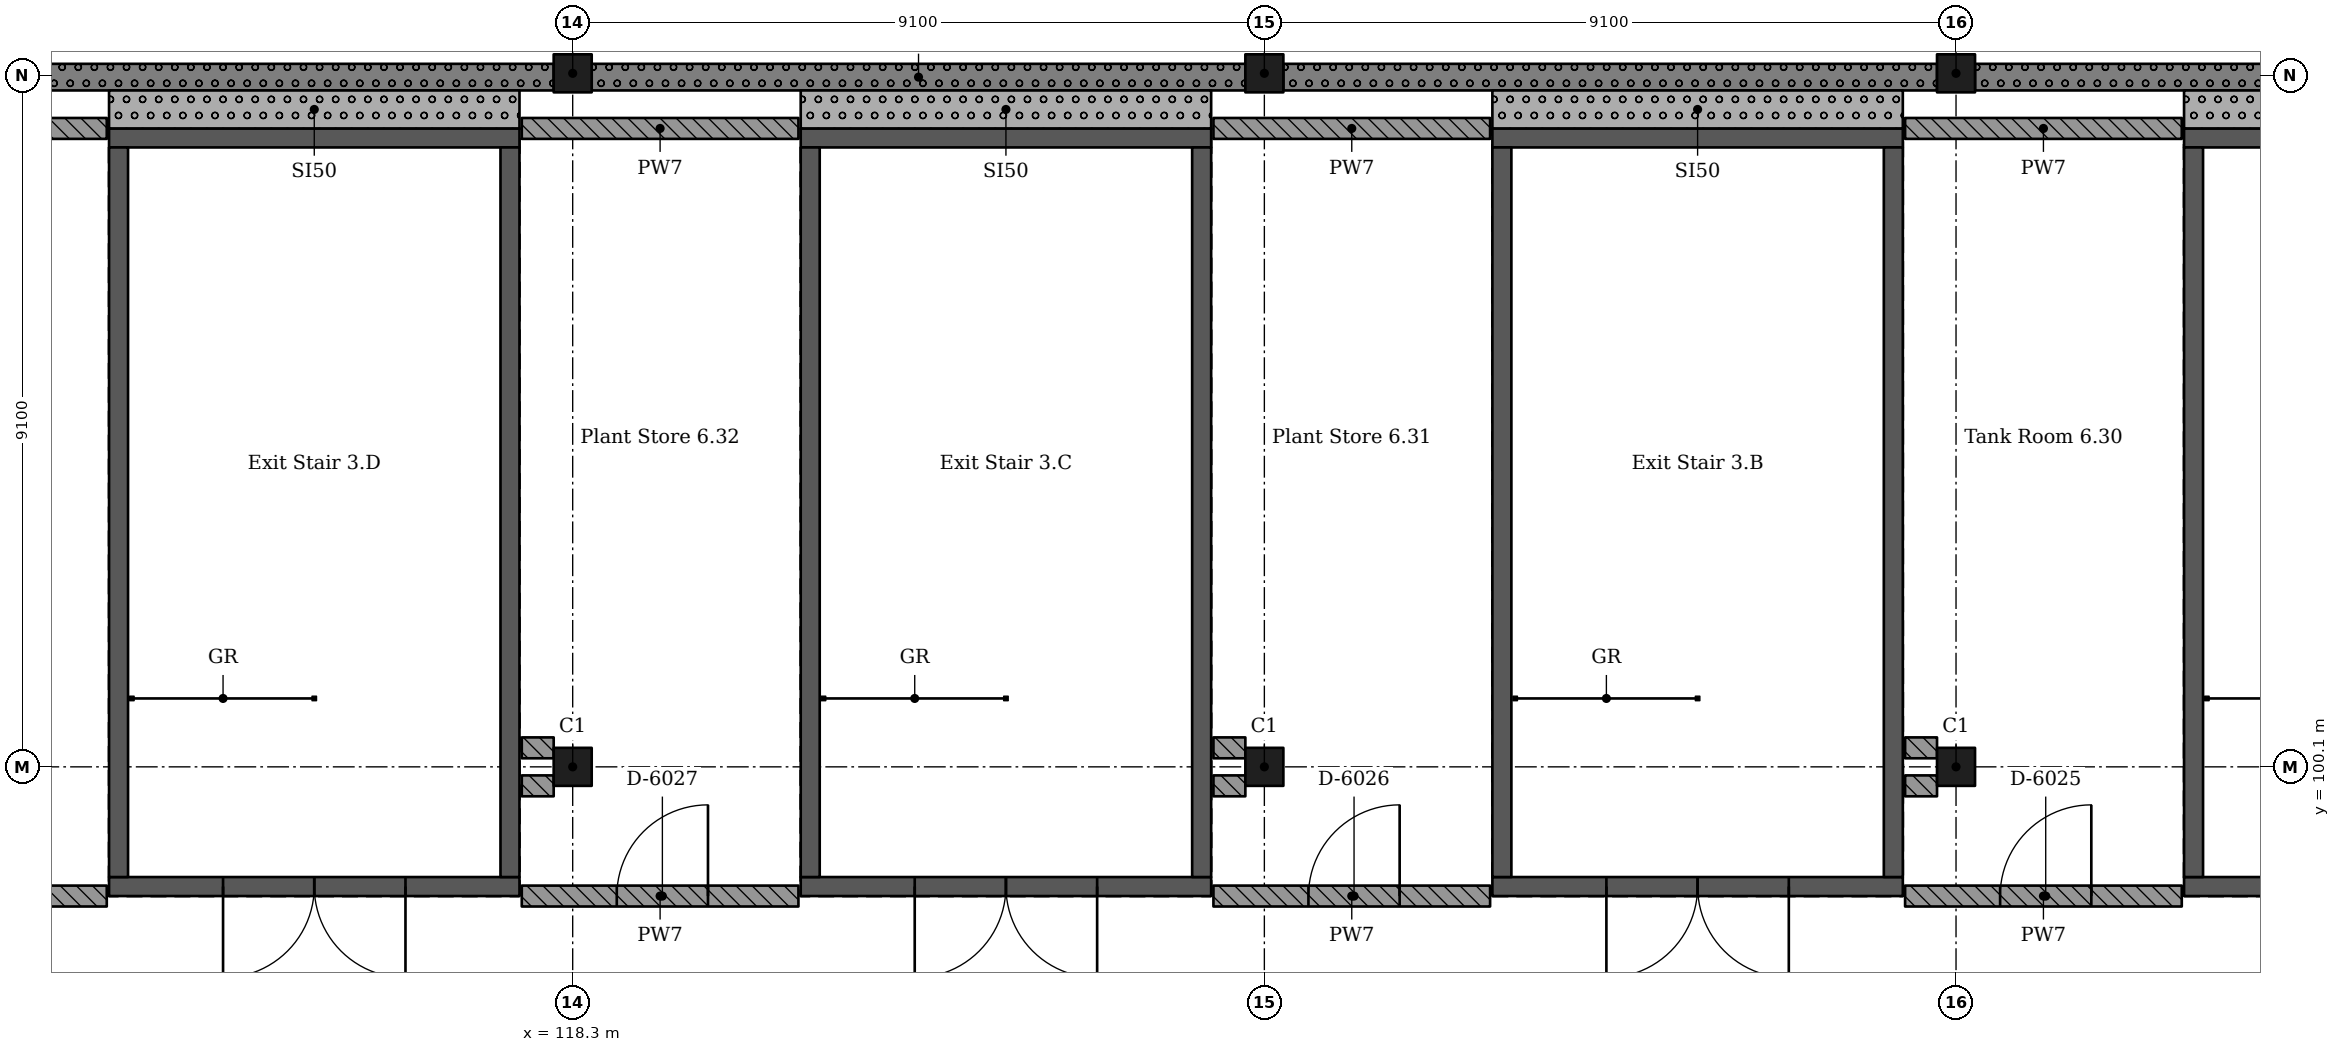
"""IFC4 building model, lengths in metres.
Left out: names, types, materials, properties, quantities, classifications, styles, units other than length and angle.
Written with IfcOpenShell. Run it as: python <this file> out.ifc"""

import sys

from ifc_helpers import new_model, si_unit, direction, frame, frame_2d, origin, origin_2d, place, context, subcontext, project, spatial, rectangle, extrude, element, fill, save


model = new_model("IFC4")
c1 = context("Model", 3, precision=1e-05, world=origin(), true_north=direction((0.0, 1.0)))
c2 = subcontext(c1, "Body", "Model", "MODEL_VIEW")
j1 = project(units=[si_unit("LENGTHUNIT", "METRE"), si_unit("PLANEANGLEUNIT", "RADIAN")], contexts=[c1])
p1 = place(None, origin())
s1 = spatial("IfcSite", under=j1, at=p1, CompositionType="ELEMENT")
p2 = place(p1, origin())
s2 = spatial("IfcBuilding", under=s1, at=p2, CompositionType="ELEMENT")
p3 = place(p2, frame((0.0, 0.0, 29.12)))
s3 = spatial("IfcBuildingStorey", under=s2, at=p3, CompositionType="ELEMENT", Elevation=29.12)
for number, where, z_axis, x_axis in (
    (1, (118.3, 100.1, 0.0), (0.0, 0.0, 1.0), (1.0, 0.0, 0.0)),
    (2, (118.3, 109.225, 0.0), (0.0, 0.0, 1.0), (1.0, 0.0, 0.0)),
    (3, (127.4, 100.1, 0.0), (0.0, 0.0, 1.0), (1.0, 0.0, 0.0)),
    (4, (127.4, 109.225, 0.0), (0.0, 0.0, 1.0), (1.0, 0.0, 0.0)),
    (5, (136.5, 100.1, 0.0), (0.0, 0.0, 1.0), (1.0, 0.0, 0.0)),
    (6, (136.5, 109.225, 0.0), (0.0, 0.0, 1.0), (1.0, 0.0, 0.0)),
):
    element("IfcColumn", number, at=place(p3, frame(where, z_axis=z_axis, x_axis=x_axis)), inside=s3, PredefinedType="COLUMN", context=c2, shape_type="SweptSolid", body=[
        extrude(rectangle(XDim=0.5, YDim=0.5, at=origin_2d()), origin(), (0.0, 0.0, 1.0), 4.55),
    ])
p4 = place(p3, frame((144.9, 98.525, 0.0), z_axis=(0.0, 0.0, 1.0), x_axis=(-1.0, 0.0, 0.0)))
e7 = element("IfcWall", 7, at=p4, inside=s3, PredefinedType="SHEAR", context=c2, shape_type="SweptSolid", body=[
    extrude(rectangle(XDim=5.4, YDim=0.25, at=frame_2d((2.7, 0.0))), origin(), (0.0, 0.0, 1.0), 4.55),
])
p5 = place(p4, frame((1.5, 0.0, 0.0)))
e8 = element("IfcOpeningElement", 8, at=p5, cuts=e7, PredefinedType="OPENING", context=c2, shape_type="SweptSolid", body=[
    extrude(rectangle(XDim=2.4, YDim=2.1, at=frame_2d((1.2, 1.05))), frame((0.0, 0.135, 0.0), z_axis=(0.0, -1.0, 0.0), x_axis=(1.0, 0.0, 0.0)), (0.0, 0.0, 1.0), 0.27),
])
p6 = place(p3, frame((144.9, 108.375, 0.0), z_axis=(0.0, 0.0, 1.0), x_axis=(-1.0, 0.0, 0.0)))
e9 = element("IfcWall", 9, at=p6, inside=s3, PredefinedType="SHEAR", context=c2, shape_type="SweptSolid", body=[
    extrude(rectangle(XDim=5.4, YDim=0.25, at=frame_2d((2.7, 0.0))), origin(), (0.0, 0.0, 1.0), 4.55),
])
p7 = place(p3, frame((139.625, 108.25, 0.0), z_axis=(0.0, 0.0, 1.0), x_axis=(0.0, -1.0, 0.0)))
e10 = element("IfcWall", 10, at=p7, inside=s3, PredefinedType="SHEAR", context=c2, shape_type="SweptSolid", body=[
    extrude(rectangle(XDim=9.6, YDim=0.25, at=frame_2d((4.8, 0.0))), origin(), (0.0, 0.0, 1.0), 4.55),
])
p8 = place(p3, frame((135.8, 98.525, 0.0), z_axis=(0.0, 0.0, 1.0), x_axis=(-1.0, 0.0, 0.0)))
e11 = element("IfcWall", 11, at=p8, inside=s3, PredefinedType="SHEAR", context=c2, shape_type="SweptSolid", body=[
    extrude(rectangle(XDim=5.4, YDim=0.25, at=frame_2d((2.7, 0.0))), origin(), (0.0, 0.0, 1.0), 4.55),
])
p9 = place(p8, frame((1.5, 0.0, 0.0)))
e12 = element("IfcOpeningElement", 12, at=p9, cuts=e11, PredefinedType="OPENING", context=c2, shape_type="SweptSolid", body=[
    extrude(rectangle(XDim=2.4, YDim=2.1, at=frame_2d((1.2, 1.05))), frame((0.0, 0.135, 0.0), z_axis=(0.0, -1.0, 0.0), x_axis=(1.0, 0.0, 0.0)), (0.0, 0.0, 1.0), 0.27),
])
p10 = place(p3, frame((135.8, 108.375, 0.0), z_axis=(0.0, 0.0, 1.0), x_axis=(-1.0, 0.0, 0.0)))
e13 = element("IfcWall", 13, at=p10, inside=s3, PredefinedType="SHEAR", context=c2, shape_type="SweptSolid", body=[
    extrude(rectangle(XDim=5.4, YDim=0.25, at=frame_2d((2.7, 0.0))), origin(), (0.0, 0.0, 1.0), 4.55),
])
for number, where, z_axis, x_axis in (
    (14, (130.525, 108.25, 0.0), (0.0, 0.0, 1.0), (0.0, -1.0, 0.0)),
    (15, (135.675, 108.25, 0.0), (0.0, 0.0, 1.0), (0.0, -1.0, 0.0)),
):
    element("IfcWall", number, at=place(p3, frame(where, z_axis=z_axis, x_axis=x_axis)), inside=s3, PredefinedType="SHEAR", context=c2, shape_type="SweptSolid", body=[
        extrude(rectangle(XDim=9.6, YDim=0.25, at=frame_2d((4.8, 0.0))), origin(), (0.0, 0.0, 1.0), 4.55),
    ])
p11 = place(p3, frame((126.7, 98.525, 0.0), z_axis=(0.0, 0.0, 1.0), x_axis=(-1.0, 0.0, 0.0)))
e16 = element("IfcWall", 16, at=p11, inside=s3, PredefinedType="SHEAR", context=c2, shape_type="SweptSolid", body=[
    extrude(rectangle(XDim=5.4, YDim=0.25, at=frame_2d((2.7, 0.0))), origin(), (0.0, 0.0, 1.0), 4.55),
])
p12 = place(p11, frame((1.5, 0.0, 0.0)))
e17 = element("IfcOpeningElement", 17, at=p12, cuts=e16, PredefinedType="OPENING", context=c2, shape_type="SweptSolid", body=[
    extrude(rectangle(XDim=2.4, YDim=2.1, at=frame_2d((1.2, 1.05))), frame((0.0, 0.135, 0.0), z_axis=(0.0, -1.0, 0.0), x_axis=(1.0, 0.0, 0.0)), (0.0, 0.0, 1.0), 0.27),
])
p13 = place(p3, frame((126.7, 108.375, 0.0), z_axis=(0.0, 0.0, 1.0), x_axis=(-1.0, 0.0, 0.0)))
e18 = element("IfcWall", 18, at=p13, inside=s3, PredefinedType="SHEAR", context=c2, shape_type="SweptSolid", body=[
    extrude(rectangle(XDim=5.4, YDim=0.25, at=frame_2d((2.7, 0.0))), origin(), (0.0, 0.0, 1.0), 4.55),
])
for number, where, z_axis, x_axis in (
    (19, (121.425, 108.25, 0.0), (0.0, 0.0, 1.0), (0.0, -1.0, 0.0)),
    (20, (126.575, 108.25, 0.0), (0.0, 0.0, 1.0), (0.0, -1.0, 0.0)),
):
    element("IfcWall", number, at=place(p3, frame(where, z_axis=z_axis, x_axis=x_axis)), inside=s3, PredefinedType="SHEAR", context=c2, shape_type="SweptSolid", body=[
        extrude(rectangle(XDim=9.6, YDim=0.25, at=frame_2d((4.8, 0.0))), origin(), (0.0, 0.0, 1.0), 4.55),
    ])
p14 = place(p3, frame((117.6, 98.525, 0.0), z_axis=(0.0, 0.0, 1.0), x_axis=(-1.0, 0.0, 0.0)))
e21 = element("IfcWall", 21, at=p14, inside=s3, PredefinedType="SHEAR", context=c2, shape_type="SweptSolid", body=[
    extrude(rectangle(XDim=5.4, YDim=0.25, at=frame_2d((2.7, 0.0))), origin(), (0.0, 0.0, 1.0), 4.55),
])
p15 = place(p14, frame((1.5, 0.0, 0.0)))
e22 = element("IfcOpeningElement", 22, at=p15, cuts=e21, PredefinedType="OPENING", context=c2, shape_type="SweptSolid", body=[
    extrude(rectangle(XDim=2.4, YDim=2.1, at=frame_2d((1.2, 1.05))), frame((0.0, 0.135, 0.0), z_axis=(0.0, -1.0, 0.0), x_axis=(1.0, 0.0, 0.0)), (0.0, 0.0, 1.0), 0.27),
])
p16 = place(p3, frame((117.6, 108.375, 0.0), z_axis=(0.0, 0.0, 1.0), x_axis=(-1.0, 0.0, 0.0)))
e23 = element("IfcWall", 23, at=p16, inside=s3, PredefinedType="SHEAR", context=c2, shape_type="SweptSolid", body=[
    extrude(rectangle(XDim=5.4, YDim=0.25, at=frame_2d((2.7, 0.0))), origin(), (0.0, 0.0, 1.0), 4.55),
])
for number, where, z_axis, x_axis in (
    (24, (112.325, 108.25, 0.0), (0.0, 0.0, 1.0), (0.0, -1.0, 0.0)),
    (25, (117.475, 108.25, 0.0), (0.0, 0.0, 1.0), (0.0, -1.0, 0.0)),
):
    element("IfcWall", number, at=place(p3, frame(where, z_axis=z_axis, x_axis=x_axis)), inside=s3, PredefinedType="SHEAR", context=c2, shape_type="SweptSolid", body=[
        extrude(rectangle(XDim=9.6, YDim=0.25, at=frame_2d((4.8, 0.0))), origin(), (0.0, 0.0, 1.0), 4.55),
    ])
for number, where, z_axis, x_axis in (
    (26, (145.35, 109.175, 0.0), (0.0, 0.0, 1.0), (-1.0, 0.0, 0.0)),
    (27, (136.25, 109.175, 0.0), (0.0, 0.0, 1.0), (-1.0, 0.0, 0.0)),
):
    element("IfcWall", number, at=place(p3, frame(where, z_axis=z_axis, x_axis=x_axis)), inside=s3, PredefinedType="SOLIDWALL", context=c2, shape_type="SweptSolid", body=[
        extrude(rectangle(XDim=8.6, YDim=0.35, at=frame_2d((4.3, 0.0))), origin(), (0.0, 0.0, 1.0), 4.5),
    ])
p17 = place(p3, frame((127.15, 109.175, 0.0), z_axis=(0.0, 0.0, 1.0), x_axis=(-1.0, 0.0, 0.0)))
e28 = element("IfcWall", 28, at=p17, inside=s3, PredefinedType="SOLIDWALL", context=c2, shape_type="SweptSolid", body=[
    extrude(rectangle(XDim=8.6, YDim=0.35, at=frame_2d((4.3, 0.0))), origin(), (0.0, 0.0, 1.0), 4.5),
])
p18 = place(p3, frame((118.05, 109.175, 0.0), z_axis=(0.0, 0.0, 1.0), x_axis=(-1.0, 0.0, 0.0)))
e29 = element("IfcWall", 29, at=p18, inside=s3, PredefinedType="SOLIDWALL", context=c2, shape_type="SweptSolid", body=[
    extrude(rectangle(XDim=8.6, YDim=0.35, at=frame_2d((4.3, 0.0))), origin(), (0.0, 0.0, 1.0), 4.5),
])
p19 = place(p3, frame((139.5, 108.75, 0.0), z_axis=(0.0, 0.0, 1.0), x_axis=(1.0, 0.0, 0.0)))
e30 = element("IfcWall", 30, at=p19, inside=s3, PredefinedType="SOLIDWALL", context=c2, shape_type="SweptSolid", body=[
    extrude(rectangle(XDim=5.4, YDim=0.5, at=frame_2d((2.7, 0.0))), origin(), (0.0, 0.0, 1.0), 3.88),
])
p20 = place(p3, frame((130.4, 108.75, 0.0), z_axis=(0.0, 0.0, 1.0), x_axis=(1.0, 0.0, 0.0)))
e31 = element("IfcWall", 31, at=p20, inside=s3, PredefinedType="SOLIDWALL", context=c2, shape_type="SweptSolid", body=[
    extrude(rectangle(XDim=5.4, YDim=0.5, at=frame_2d((2.7, 0.0))), origin(), (0.0, 0.0, 1.0), 3.88),
])
p21 = place(p3, frame((121.3, 108.75, 0.0), z_axis=(0.0, 0.0, 1.0), x_axis=(1.0, 0.0, 0.0)))
e32 = element("IfcWall", 32, at=p21, inside=s3, PredefinedType="SOLIDWALL", context=c2, shape_type="SweptSolid", body=[
    extrude(rectangle(XDim=5.4, YDim=0.5, at=frame_2d((2.7, 0.0))), origin(), (0.0, 0.0, 1.0), 3.88),
])
p22 = place(p3, frame((112.2, 108.75, 0.0), z_axis=(0.0, 0.0, 1.0), x_axis=(1.0, 0.0, 0.0)))
e33 = element("IfcWall", 33, at=p22, inside=s3, PredefinedType="SOLIDWALL", context=c2, shape_type="SweptSolid", body=[
    extrude(rectangle(XDim=5.4, YDim=0.5, at=frame_2d((2.7, 0.0))), origin(), (0.0, 0.0, 1.0), 3.88),
])
p23 = place(p3, frame((104.9, 108.5, 0.0), z_axis=(0.0, 0.0, 1.0), x_axis=(1.0, 0.0, 0.0)))
e34 = element("IfcWall", 34, at=p23, inside=s3, PredefinedType="SOLIDWALL", context=c2, shape_type="SweptSolid", body=[
    extrude(rectangle(XDim=7.27, YDim=0.275, at=frame_2d((3.635, 0.0))), origin(), (0.0, 0.0, 1.0), 3.88),
])
p24 = place(p3, frame((109.312, 98.4, 0.0), z_axis=(0.0, 0.0, 1.0), x_axis=(1.0, 0.0, 0.0)))
e35 = element("IfcWall", 35, at=p24, inside=s3, PredefinedType="SOLIDWALL", context=c2, shape_type="SweptSolid", body=[
    extrude(rectangle(XDim=2.857, YDim=0.275, at=frame_2d((1.429, 0.0))), origin(), (0.0, 0.0, 1.0), 3.88),
])
p25 = place(p3, frame((117.63, 98.4, 0.0), z_axis=(0.0, 0.0, 1.0), x_axis=(1.0, 0.0, 0.0)))
e36 = element("IfcWall", 36, at=p25, inside=s3, PredefinedType="SOLIDWALL", context=c2, shape_type="SweptSolid", body=[
    extrude(rectangle(XDim=3.64, YDim=0.275, at=frame_2d((1.82, 0.0))), origin(), (0.0, 0.0, 1.0), 3.88),
])
p26 = place(p25, frame((1.25, 0.0, 0.0)))
e37 = element("IfcOpeningElement", 37, at=p26, cuts=e36, PredefinedType="OPENING", context=c2, shape_type="SweptSolid", body=[
    extrude(rectangle(XDim=1.2, YDim=2.4, at=frame_2d((0.6, 1.2))), frame((0.0, 0.147, 0.0), z_axis=(0.0, -1.0, 0.0), x_axis=(1.0, 0.0, 0.0)), (0.0, 0.0, 1.0), 0.295),
])
p27 = place(p3, frame((117.63, 99.85, 0.0), z_axis=(0.0, 0.0, 1.0), x_axis=(1.0, 0.0, 0.0)))
e38 = element("IfcWall", 38, at=p27, inside=s3, PredefinedType="SOLIDWALL", context=c2, shape_type="SweptSolid", body=[
    extrude(rectangle(XDim=0.42, YDim=0.275, at=frame_2d((0.21, 0.0))), origin(), (0.0, 0.0, 1.0), 3.88),
])
p28 = place(p3, frame((117.63, 108.5, 0.0), z_axis=(0.0, 0.0, 1.0), x_axis=(1.0, 0.0, 0.0)))
e39 = element("IfcWall", 39, at=p28, inside=s3, PredefinedType="SOLIDWALL", context=c2, shape_type="SweptSolid", body=[
    extrude(rectangle(XDim=3.64, YDim=0.275, at=frame_2d((1.82, 0.0))), origin(), (0.0, 0.0, 1.0), 3.88),
])
p29 = place(p3, frame((118.05, 100.35, 0.0), z_axis=(0.0, 0.0, 1.0), x_axis=(-1.0, 0.0, 0.0)))
e40 = element("IfcWall", 40, at=p29, inside=s3, PredefinedType="SOLIDWALL", context=c2, shape_type="SweptSolid", body=[
    extrude(rectangle(XDim=0.42, YDim=0.275, at=frame_2d((0.21, 0.0))), origin(), (0.0, 0.0, 1.0), 3.88),
])
p30 = place(p3, frame((126.73, 98.4, 0.0), z_axis=(0.0, 0.0, 1.0), x_axis=(1.0, 0.0, 0.0)))
e41 = element("IfcWall", 41, at=p30, inside=s3, PredefinedType="SOLIDWALL", context=c2, shape_type="SweptSolid", body=[
    extrude(rectangle(XDim=3.64, YDim=0.275, at=frame_2d((1.82, 0.0))), origin(), (0.0, 0.0, 1.0), 3.88),
])
p31 = place(p30, frame((1.25, 0.0, 0.0)))
e42 = element("IfcOpeningElement", 42, at=p31, cuts=e41, PredefinedType="OPENING", context=c2, shape_type="SweptSolid", body=[
    extrude(rectangle(XDim=1.2, YDim=2.4, at=frame_2d((0.6, 1.2))), frame((0.0, 0.147, 0.0), z_axis=(0.0, -1.0, 0.0), x_axis=(1.0, 0.0, 0.0)), (0.0, 0.0, 1.0), 0.295),
])
p32 = place(p3, frame((126.73, 99.85, 0.0), z_axis=(0.0, 0.0, 1.0), x_axis=(1.0, 0.0, 0.0)))
e43 = element("IfcWall", 43, at=p32, inside=s3, PredefinedType="SOLIDWALL", context=c2, shape_type="SweptSolid", body=[
    extrude(rectangle(XDim=0.42, YDim=0.275, at=frame_2d((0.21, 0.0))), origin(), (0.0, 0.0, 1.0), 3.88),
])
p33 = place(p3, frame((126.73, 108.5, 0.0), z_axis=(0.0, 0.0, 1.0), x_axis=(1.0, 0.0, 0.0)))
e44 = element("IfcWall", 44, at=p33, inside=s3, PredefinedType="SOLIDWALL", context=c2, shape_type="SweptSolid", body=[
    extrude(rectangle(XDim=3.64, YDim=0.275, at=frame_2d((1.82, 0.0))), origin(), (0.0, 0.0, 1.0), 3.88),
])
p34 = place(p3, frame((127.15, 100.35, 0.0), z_axis=(0.0, 0.0, 1.0), x_axis=(-1.0, 0.0, 0.0)))
e45 = element("IfcWall", 45, at=p34, inside=s3, PredefinedType="SOLIDWALL", context=c2, shape_type="SweptSolid", body=[
    extrude(rectangle(XDim=0.42, YDim=0.275, at=frame_2d((0.21, 0.0))), origin(), (0.0, 0.0, 1.0), 3.88),
])
p35 = place(p3, frame((135.83, 98.4, 0.0), z_axis=(0.0, 0.0, 1.0), x_axis=(1.0, 0.0, 0.0)))
e46 = element("IfcWall", 46, at=p35, inside=s3, PredefinedType="SOLIDWALL", context=c2, shape_type="SweptSolid", body=[
    extrude(rectangle(XDim=3.64, YDim=0.275, at=frame_2d((1.82, 0.0))), origin(), (0.0, 0.0, 1.0), 3.88),
])
p36 = place(p35, frame((1.25, 0.0, 0.0)))
e47 = element("IfcOpeningElement", 47, at=p36, cuts=e46, PredefinedType="OPENING", context=c2, shape_type="SweptSolid", body=[
    extrude(rectangle(XDim=1.2, YDim=2.4, at=frame_2d((0.6, 1.2))), frame((0.0, 0.147, 0.0), z_axis=(0.0, -1.0, 0.0), x_axis=(1.0, 0.0, 0.0)), (0.0, 0.0, 1.0), 0.295),
])
p37 = place(p3, frame((135.83, 99.85, 0.0), z_axis=(0.0, 0.0, 1.0), x_axis=(1.0, 0.0, 0.0)))
e48 = element("IfcWall", 48, at=p37, inside=s3, PredefinedType="SOLIDWALL", context=c2, shape_type="SweptSolid", body=[
    extrude(rectangle(XDim=0.42, YDim=0.275, at=frame_2d((0.21, 0.0))), origin(), (0.0, 0.0, 1.0), 3.88),
])
p38 = place(p3, frame((135.83, 108.5, 0.0), z_axis=(0.0, 0.0, 1.0), x_axis=(1.0, 0.0, 0.0)))
e49 = element("IfcWall", 49, at=p38, inside=s3, PredefinedType="SOLIDWALL", context=c2, shape_type="SweptSolid", body=[
    extrude(rectangle(XDim=3.64, YDim=0.275, at=frame_2d((1.82, 0.0))), origin(), (0.0, 0.0, 1.0), 3.88),
])
p39 = place(p3, frame((136.25, 100.35, 0.0), z_axis=(0.0, 0.0, 1.0), x_axis=(-1.0, 0.0, 0.0)))
e50 = element("IfcWall", 50, at=p39, inside=s3, PredefinedType="SOLIDWALL", context=c2, shape_type="SweptSolid", body=[
    extrude(rectangle(XDim=0.42, YDim=0.275, at=frame_2d((0.21, 0.0))), origin(), (0.0, 0.0, 1.0), 3.88),
])
p40 = place(p36, origin())
e51 = element("IfcDoor", 51, at=p40, inside=s3, OperationType="SINGLE_SWING_LEFT", PredefinedType="DOOR", context=c2, shape_type="SweptSolid", body=[
    extrude(rectangle(XDim=1.2, YDim=2.4, at=frame_2d((0.6, 1.2))), frame((0.0, 0.025, 0.0), z_axis=(0.0, -1.0, 0.0), x_axis=(1.0, 0.0, 0.0)), (0.0, 0.0, 1.0), 0.05),
])
fill(e47, e51)
p41 = place(p31, origin())
e52 = element("IfcDoor", 52, at=p41, inside=s3, OperationType="SINGLE_SWING_LEFT", PredefinedType="DOOR", context=c2, shape_type="SweptSolid", body=[
    extrude(rectangle(XDim=1.2, YDim=2.4, at=frame_2d((0.6, 1.2))), frame((0.0, 0.025, 0.0), z_axis=(0.0, -1.0, 0.0), x_axis=(1.0, 0.0, 0.0)), (0.0, 0.0, 1.0), 0.05),
])
fill(e42, e52)
p42 = place(p26, origin())
e53 = element("IfcDoor", 53, at=p42, inside=s3, OperationType="SINGLE_SWING_LEFT", PredefinedType="DOOR", context=c2, shape_type="SweptSolid", body=[
    extrude(rectangle(XDim=1.2, YDim=2.4, at=frame_2d((0.6, 1.2))), frame((0.0, 0.025, 0.0), z_axis=(0.0, -1.0, 0.0), x_axis=(1.0, 0.0, 0.0)), (0.0, 0.0, 1.0), 0.05),
])
fill(e37, e53)
p43 = place(p9, origin())
e54 = element("IfcDoor", 54, at=p43, inside=s3, OperationType="DOUBLE_DOOR_SINGLE_SWING", PredefinedType="DOOR", context=c2, shape_type="SweptSolid", body=[
    extrude(rectangle(XDim=2.4, YDim=2.1, at=frame_2d((1.2, 1.05))), frame((0.0, 0.025, 0.0), z_axis=(0.0, -1.0, 0.0), x_axis=(1.0, 0.0, 0.0)), (0.0, 0.0, 1.0), 0.05),
])
fill(e12, e54)
p44 = place(p12, origin())
e55 = element("IfcDoor", 55, at=p44, inside=s3, OperationType="DOUBLE_DOOR_SINGLE_SWING", PredefinedType="DOOR", context=c2, shape_type="SweptSolid", body=[
    extrude(rectangle(XDim=2.4, YDim=2.1, at=frame_2d((1.2, 1.05))), frame((0.0, 0.025, 0.0), z_axis=(0.0, -1.0, 0.0), x_axis=(1.0, 0.0, 0.0)), (0.0, 0.0, 1.0), 0.05),
])
fill(e17, e55)
p45 = place(p15, origin())
e56 = element("IfcDoor", 56, at=p45, inside=s3, OperationType="DOUBLE_DOOR_SINGLE_SWING", PredefinedType="DOOR", context=c2, shape_type="SweptSolid", body=[
    extrude(rectangle(XDim=2.4, YDim=2.1, at=frame_2d((1.2, 1.05))), frame((0.0, 0.025, 0.0), z_axis=(0.0, -1.0, 0.0), x_axis=(1.0, 0.0, 0.0)), (0.0, 0.0, 1.0), 0.05),
])
fill(e22, e56)
save(model, sys.argv[1])
